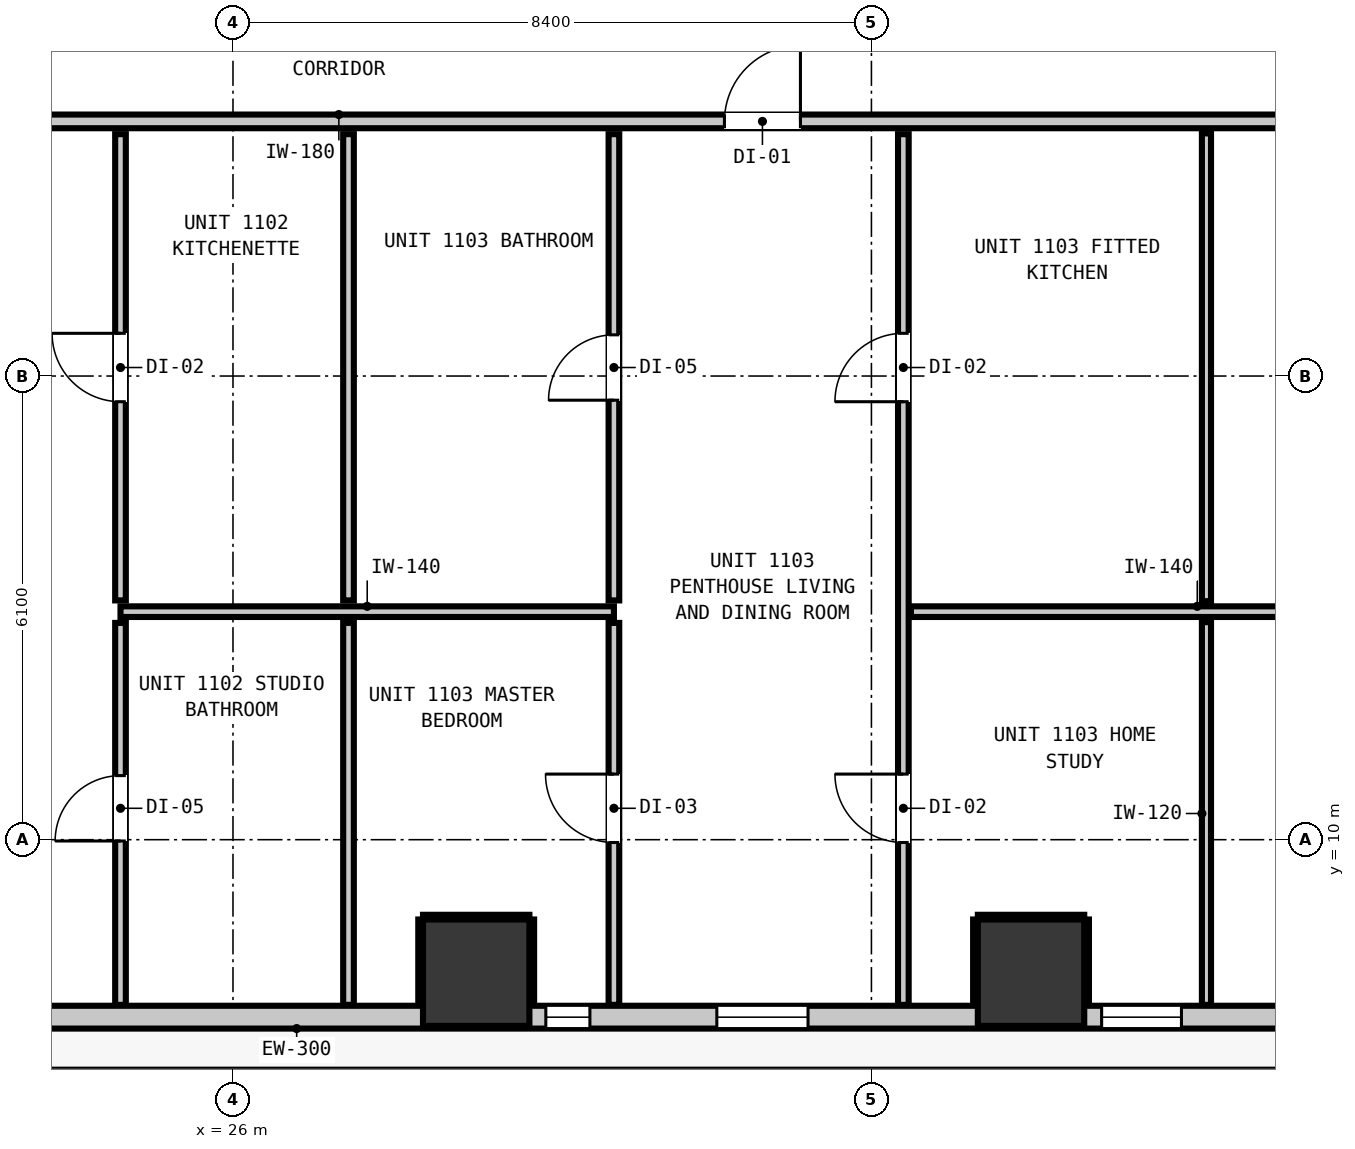
"""IFC4 building model, lengths in metres.
Left out: names, types, materials, properties, quantities, classifications, styles, units other than length and angle.
Written with IfcOpenShell. Run it as: python <this file> out.ifc"""

import sys

from ifc_helpers import new_model, si_unit, direction, frame, frame_2d, origin, origin_2d, place, context, subcontext, project, spatial, rectangle, extrude, element, fill, save


model = new_model("IFC4")
c1 = context("Model", 3, precision=1e-05, world=origin(), true_north=direction((0.0, 1.0)))
c2 = subcontext(c1, "Body", "Model", "MODEL_VIEW")
j1 = project(units=[si_unit("LENGTHUNIT", "METRE"), si_unit("PLANEANGLEUNIT", "RADIAN")], contexts=[c1])
p1 = place(None, origin())
s1 = spatial("IfcSite", under=j1, at=p1, CompositionType="ELEMENT")
p2 = place(p1, origin())
s2 = spatial("IfcBuilding", under=s1, at=p2, CompositionType="ELEMENT")
p3 = place(p2, frame((0.0, 0.0, 41.92)))
s3 = spatial("IfcBuildingStorey", under=s2, at=p3, CompositionType="ELEMENT", Elevation=41.92)
for number, where, z_axis, x_axis in (
    (1, (29.2, 8.25, -0.2), (0.0, 0.0, 1.0), (1.0, 0.0, 0.0)),
    (2, (36.5, 8.25, -0.2), (0.0, 0.0, 1.0), (1.0, 0.0, 0.0)),
):
    element("IfcColumn", number, at=place(p3, frame(where, z_axis=z_axis, x_axis=x_axis)), inside=s3, PredefinedType="COLUMN", context=c2, shape_type="SweptSolid", body=[
        extrude(rectangle(XDim=1.4, YDim=1.4, at=origin_2d()), origin(), (0.0, 0.0, 1.0), 3.52),
    ])
p4 = place(p3, frame((47.835, 7.665, 0.0), z_axis=(0.0, 0.0, 1.0), x_axis=(-1.0, 0.0, 0.0)))
e3 = element("IfcWall", 3, at=p4, inside=s3, PredefinedType="STANDARD", context=c2, shape_type="SweptSolid", body=[
    extrude(rectangle(XDim=37.47, YDim=0.3, at=frame_2d((18.735, 0.0))), origin(), (0.0, 0.0, 1.0), 3.06),
])
p5 = place(p4, frame((1.251, 0.0, 0.0)))
e4 = element("IfcOpeningElement", 4, at=p5, cuts=e3, PredefinedType="OPENING", context=c2, shape_type="SweptSolid", body=[
    extrude(rectangle(XDim=1.0, YDim=2.15, at=frame_2d((0.5, 1.075))), frame((0.0, 0.16, 0.0), z_axis=(0.0, -1.0, 0.0), x_axis=(1.0, 0.0, 0.0)), (0.0, 0.0, 1.0), 0.32),
])
p6 = place(p4, frame((30.675, 0.0, 0.85)))
e5 = element("IfcOpeningElement", 5, at=p6, cuts=e3, PredefinedType="OPENING", context=c2, shape_type="SweptSolid", body=[
    extrude(rectangle(XDim=1.2, YDim=1.8, at=frame_2d((0.6, 0.9))), frame((0.0, 0.16, 0.0), z_axis=(0.0, -1.0, 0.0), x_axis=(1.0, 0.0, 0.0)), (0.0, 0.0, 1.0), 0.32),
])
p7 = place(p4, frame((24.275, 0.0, 0.85)))
e6 = element("IfcOpeningElement", 6, at=p7, cuts=e3, PredefinedType="OPENING", context=c2, shape_type="SweptSolid", body=[
    extrude(rectangle(XDim=1.2, YDim=1.8, at=frame_2d((0.6, 0.9))), frame((0.0, 0.16, 0.0), z_axis=(0.0, -1.0, 0.0), x_axis=(1.0, 0.0, 0.0)), (0.0, 0.0, 1.0), 0.32),
])
p8 = place(p4, frame((14.269, 0.0, 0.85)))
e7 = element("IfcOpeningElement", 7, at=p8, cuts=e3, PredefinedType="OPENING", context=c2, shape_type="SweptSolid", body=[
    extrude(rectangle(XDim=1.2, YDim=1.8, at=frame_2d((0.6, 0.9))), frame((0.0, 0.16, 0.0), z_axis=(0.0, -1.0, 0.0), x_axis=(1.0, 0.0, 0.0)), (0.0, 0.0, 1.0), 0.32),
])
p9 = place(p4, frame((17.139, 0.0, 0.85)))
e8 = element("IfcOpeningElement", 8, at=p9, cuts=e3, PredefinedType="OPENING", context=c2, shape_type="SweptSolid", body=[
    extrude(rectangle(XDim=0.58, YDim=1.5, at=frame_2d((0.29, 0.75))), frame((0.0, 0.16, 0.0), z_axis=(0.0, -1.0, 0.0), x_axis=(1.0, 0.0, 0.0)), (0.0, 0.0, 1.0), 0.32),
])
p10 = place(p4, frame((9.356, 0.0, 0.85)))
e9 = element("IfcOpeningElement", 9, at=p10, cuts=e3, PredefinedType="OPENING", context=c2, shape_type="SweptSolid", body=[
    extrude(rectangle(XDim=1.05, YDim=1.65, at=frame_2d((0.525, 0.825))), frame((0.0, 0.16, 0.0), z_axis=(0.0, -1.0, 0.0), x_axis=(1.0, 0.0, 0.0)), (0.0, 0.0, 1.0), 0.32),
])
p11 = place(p4, frame((5.089, 0.0, 0.85)))
e10 = element("IfcOpeningElement", 10, at=p11, cuts=e3, PredefinedType="OPENING", context=c2, shape_type="SweptSolid", body=[
    extrude(rectangle(XDim=1.2, YDim=1.8, at=frame_2d((0.6, 0.9))), frame((0.0, 0.16, 0.0), z_axis=(0.0, -1.0, 0.0), x_axis=(1.0, 0.0, 0.0)), (0.0, 0.0, 1.0), 0.32),
])
p12 = place(p3, frame((8.027, 19.45, 0.0), z_axis=(0.0, 0.0, 1.0), x_axis=(1.0, 0.0, 0.0)))
e11 = element("IfcWall", 11, at=p12, inside=s3, PredefinedType="PARTITIONING", context=c2, shape_type="SweptSolid", body=[
    extrude(rectangle(XDim=42.146, YDim=0.18, at=frame_2d((21.073, 0.0))), origin(), (0.0, 0.0, 1.0), 3.06),
])
p13 = place(p12, frame((6.533, 0.0, 0.0)))
e12 = element("IfcOpeningElement", 12, at=p13, cuts=e11, PredefinedType="OPENING", context=c2, shape_type="SweptSolid", body=[
    extrude(rectangle(XDim=1.0, YDim=2.15, at=frame_2d((0.5, 1.075))), frame((0.0, 0.1, 0.0), z_axis=(0.0, -1.0, 0.0), x_axis=(1.0, 0.0, 0.0)), (0.0, 0.0, 1.0), 0.2),
])
p14 = place(p12, frame((13.293, 0.0, 0.0)))
e13 = element("IfcOpeningElement", 13, at=p14, cuts=e11, PredefinedType="OPENING", context=c2, shape_type="SweptSolid", body=[
    extrude(rectangle(XDim=1.0, YDim=2.15, at=frame_2d((0.5, 1.075))), frame((0.0, 0.1, 0.0), z_axis=(0.0, -1.0, 0.0), x_axis=(1.0, 0.0, 0.0)), (0.0, 0.0, 1.0), 0.2),
])
p15 = place(p12, frame((24.439, 0.0, 0.0)))
e14 = element("IfcOpeningElement", 14, at=p15, cuts=e11, PredefinedType="OPENING", context=c2, shape_type="SweptSolid", body=[
    extrude(rectangle(XDim=1.0, YDim=2.15, at=frame_2d((0.5, 1.075))), frame((0.0, 0.1, 0.0), z_axis=(0.0, -1.0, 0.0), x_axis=(1.0, 0.0, 0.0)), (0.0, 0.0, 1.0), 0.2),
])
p16 = place(p12, frame((34.477, 0.0, 0.0)))
e15 = element("IfcOpeningElement", 15, at=p16, cuts=e11, PredefinedType="OPENING", context=c2, shape_type="SweptSolid", body=[
    extrude(rectangle(XDim=1.0, YDim=2.15, at=frame_2d((0.5, 1.075))), frame((0.0, 0.1, 0.0), z_axis=(0.0, -1.0, 0.0), x_axis=(1.0, 0.0, 0.0)), (0.0, 0.0, 1.0), 0.2),
])
p17 = place(p3, frame((24.52, 13.0, 0.0), z_axis=(0.0, 0.0, 1.0), x_axis=(1.0, 0.0, 0.0)))
e16 = element("IfcWall", 16, at=p17, inside=s3, PredefinedType="PARTITIONING", context=c2, shape_type="SweptSolid", body=[
    extrude(rectangle(XDim=6.492, YDim=0.14, at=frame_2d((3.246, 0.0))), origin(), (0.0, 0.0, 1.0), 3.06),
])
p18 = place(p3, frame((34.92, 13.0, 0.0), z_axis=(0.0, 0.0, 1.0), x_axis=(1.0, 0.0, 0.0)))
e17 = element("IfcWall", 17, at=p18, inside=s3, PredefinedType="PARTITIONING", context=c2, shape_type="SweptSolid", body=[
    extrude(rectangle(XDim=15.253, YDim=0.14, at=frame_2d((7.626, 0.0))), origin(), (0.0, 0.0, 1.0), 3.06),
])
p19 = place(p18, frame((7.634, 0.0, 0.0)))
e18 = element("IfcOpeningElement", 18, at=p19, cuts=e17, PredefinedType="OPENING", context=c2, shape_type="SweptSolid", body=[
    extrude(rectangle(XDim=0.9, YDim=2.1, at=frame_2d((0.45, 1.05))), frame((0.0, 0.08, 0.0), z_axis=(0.0, -1.0, 0.0), x_axis=(1.0, 0.0, 0.0)), (0.0, 0.0, 1.0), 0.16),
])
p20 = place(p3, frame((24.52, 7.827, 0.0), z_axis=(0.0, 0.0, 1.0), x_axis=(0.0, 1.0, 0.0)))
e19 = element("IfcWall", 19, at=p20, inside=s3, PredefinedType="PARTITIONING", context=c2, shape_type="SweptSolid", body=[
    extrude(rectangle(XDim=5.025, YDim=0.14, at=frame_2d((2.513, 0.0))), origin(), (0.0, 0.0, 1.0), 3.06),
])
p21 = place(p20, frame((2.156, 0.0, 0.0)))
e20 = element("IfcOpeningElement", 20, at=p21, cuts=e19, PredefinedType="OPENING", context=c2, shape_type="SweptSolid", body=[
    extrude(rectangle(XDim=0.86, YDim=2.02, at=frame_2d((0.43, 1.01))), frame((0.0, 0.08, 0.0), z_axis=(0.0, -1.0, 0.0), x_axis=(1.0, 0.0, 0.0)), (0.0, 0.0, 1.0), 0.16),
])
p22 = place(p3, frame((24.52, 13.148, 0.0), z_axis=(0.0, 0.0, 1.0), x_axis=(0.0, 1.0, 0.0)))
e21 = element("IfcWall", 21, at=p22, inside=s3, PredefinedType="PARTITIONING", context=c2, shape_type="SweptSolid", body=[
    extrude(rectangle(XDim=6.134, YDim=0.14, at=frame_2d((3.067, 0.0))), origin(), (0.0, 0.0, 1.0), 3.06),
])
p23 = place(p22, frame((2.614, 0.0, 0.0)))
e22 = element("IfcOpeningElement", 22, at=p23, cuts=e21, PredefinedType="OPENING", context=c2, shape_type="SweptSolid", body=[
    extrude(rectangle(XDim=0.9, YDim=2.1, at=frame_2d((0.45, 1.05))), frame((0.0, 0.08, 0.0), z_axis=(0.0, -1.0, 0.0), x_axis=(1.0, 0.0, 0.0)), (0.0, 0.0, 1.0), 0.16),
])
p24 = place(p3, frame((27.52, 7.827, 0.0), z_axis=(0.0, 0.0, 1.0), x_axis=(0.0, 1.0, 0.0)))
e23 = element("IfcWall", 23, at=p24, inside=s3, PredefinedType="PARTITIONING", context=c2, shape_type="SweptSolid", body=[
    extrude(rectangle(XDim=5.025, YDim=0.14, at=frame_2d((2.513, 0.0))), origin(), (0.0, 0.0, 1.0), 3.06),
])
p25 = place(p3, frame((27.52, 13.148, 0.0), z_axis=(0.0, 0.0, 1.0), x_axis=(0.0, 1.0, 0.0)))
e24 = element("IfcWall", 24, at=p25, inside=s3, PredefinedType="PARTITIONING", context=c2, shape_type="SweptSolid", body=[
    extrude(rectangle(XDim=6.134, YDim=0.14, at=frame_2d((3.067, 0.0))), origin(), (0.0, 0.0, 1.0), 3.06),
])
p26 = place(p3, frame((31.012, 7.827, 0.0), z_axis=(0.0, 0.0, 1.0), x_axis=(0.0, 1.0, 0.0)))
e25 = element("IfcWall", 25, at=p26, inside=s3, PredefinedType="PARTITIONING", context=c2, shape_type="SweptSolid", body=[
    extrude(rectangle(XDim=5.025, YDim=0.14, at=frame_2d((2.513, 0.0))), origin(), (0.0, 0.0, 1.0), 3.06),
])
p27 = place(p26, frame((2.136, 0.0, 0.0)))
e26 = element("IfcOpeningElement", 26, at=p27, cuts=e25, PredefinedType="OPENING", context=c2, shape_type="SweptSolid", body=[
    extrude(rectangle(XDim=0.9, YDim=2.1, at=frame_2d((0.45, 1.05))), frame((0.0, 0.08, 0.0), z_axis=(0.0, -1.0, 0.0), x_axis=(1.0, 0.0, 0.0)), (0.0, 0.0, 1.0), 0.16),
])
p28 = place(p3, frame((31.012, 13.148, 0.0), z_axis=(0.0, 0.0, 1.0), x_axis=(0.0, 1.0, 0.0)))
e27 = element("IfcWall", 27, at=p28, inside=s3, PredefinedType="PARTITIONING", context=c2, shape_type="SweptSolid", body=[
    extrude(rectangle(XDim=6.134, YDim=0.14, at=frame_2d((3.067, 0.0))), origin(), (0.0, 0.0, 1.0), 3.06),
])
p29 = place(p28, frame((2.634, 0.0, 0.0)))
e28 = element("IfcOpeningElement", 28, at=p29, cuts=e27, PredefinedType="OPENING", context=c2, shape_type="SweptSolid", body=[
    extrude(rectangle(XDim=0.86, YDim=2.02, at=frame_2d((0.43, 1.01))), frame((0.0, 0.08, 0.0), z_axis=(0.0, -1.0, 0.0), x_axis=(1.0, 0.0, 0.0)), (0.0, 0.0, 1.0), 0.16),
])
p30 = place(p3, frame((34.82, 7.827, 0.0), z_axis=(0.0, 0.0, 1.0), x_axis=(0.0, 1.0, 0.0)))
e29 = element("IfcWall", 29, at=p30, inside=s3, PredefinedType="PARTITIONING", context=c2, shape_type="SweptSolid", body=[
    extrude(rectangle(XDim=11.455, YDim=0.14, at=frame_2d((5.728, 0.0))), origin(), (0.0, 0.0, 1.0), 3.06),
])
p31 = place(p30, frame((7.935, 0.0, 0.0)))
e30 = element("IfcOpeningElement", 30, at=p31, cuts=e29, PredefinedType="OPENING", context=c2, shape_type="SweptSolid", body=[
    extrude(rectangle(XDim=0.9, YDim=2.1, at=frame_2d((0.45, 1.05))), frame((0.0, 0.08, 0.0), z_axis=(0.0, -1.0, 0.0), x_axis=(1.0, 0.0, 0.0)), (0.0, 0.0, 1.0), 0.16),
])
p32 = place(p30, frame((2.136, 0.0, 0.0)))
e31 = element("IfcOpeningElement", 31, at=p32, cuts=e29, PredefinedType="OPENING", context=c2, shape_type="SweptSolid", body=[
    extrude(rectangle(XDim=0.9, YDim=2.1, at=frame_2d((0.45, 1.05))), frame((0.0, 0.08, 0.0), z_axis=(0.0, -1.0, 0.0), x_axis=(1.0, 0.0, 0.0)), (0.0, 0.0, 1.0), 0.16),
])
p33 = place(p3, frame((38.808, 7.827, 0.0), z_axis=(0.0, 0.0, 1.0), x_axis=(0.0, 1.0, 0.0)))
e32 = element("IfcWall", 32, at=p33, inside=s3, PredefinedType="PARTITIONING", context=c2, shape_type="SweptSolid", body=[
    extrude(rectangle(XDim=5.035, YDim=0.12, at=frame_2d((2.518, 0.0))), origin(), (0.0, 0.0, 1.0), 3.06),
])
p34 = place(p3, frame((38.808, 13.138, 0.0), z_axis=(0.0, 0.0, 1.0), x_axis=(0.0, 1.0, 0.0)))
e33 = element("IfcWall", 33, at=p34, inside=s3, PredefinedType="PARTITIONING", context=c2, shape_type="SweptSolid", body=[
    extrude(rectangle(XDim=6.154, YDim=0.12, at=frame_2d((3.077, 0.0))), origin(), (0.0, 0.0, 1.0), 3.06),
])
p35 = place(p3, frame((28.5, 8.982, 0.0), z_axis=(0.0, 0.0, 1.0), x_axis=(1.0, 0.0, 0.0)))
e34 = element("IfcWall", 34, at=p35, inside=s3, PredefinedType="PARTITIONING", context=c2, shape_type="SweptSolid", body=[
    extrude(rectangle(XDim=1.4, YDim=0.06, at=frame_2d((0.7, 0.0))), origin(), (0.0, 0.0, 1.0), 1.45),
])
for number, where, z_axis, x_axis in (
    (35, (28.468, 7.83, 0.0), (0.0, 0.0, 1.0), (0.0, 1.0, 0.0)),
    (36, (29.932, 7.83, 0.0), (0.0, 0.0, 1.0), (0.0, 1.0, 0.0)),
):
    element("IfcWall", number, at=place(p3, frame(where, z_axis=z_axis, x_axis=x_axis)), inside=s3, PredefinedType="PARTITIONING", context=c2, shape_type="SweptSolid", body=[
        extrude(rectangle(XDim=1.12, YDim=0.06, at=frame_2d((0.56, 0.0))), origin(), (0.0, 0.0, 1.0), 1.45),
    ])
p36 = place(p3, frame((35.8, 8.982, 0.0), z_axis=(0.0, 0.0, 1.0), x_axis=(1.0, 0.0, 0.0)))
e37 = element("IfcWall", 37, at=p36, inside=s3, PredefinedType="PARTITIONING", context=c2, shape_type="SweptSolid", body=[
    extrude(rectangle(XDim=1.4, YDim=0.06, at=frame_2d((0.7, 0.0))), origin(), (0.0, 0.0, 1.0), 1.45),
])
for number, where, z_axis, x_axis in (
    (38, (35.768, 7.83, 0.0), (0.0, 0.0, 1.0), (0.0, 1.0, 0.0)),
    (39, (37.232, 7.83, 0.0), (0.0, 0.0, 1.0), (0.0, 1.0, 0.0)),
):
    element("IfcWall", number, at=place(p3, frame(where, z_axis=z_axis, x_axis=x_axis)), inside=s3, PredefinedType="PARTITIONING", context=c2, shape_type="SweptSolid", body=[
        extrude(rectangle(XDim=1.12, YDim=0.06, at=frame_2d((0.56, 0.0))), origin(), (0.0, 0.0, 1.0), 1.45),
    ])
p37 = place(p8, origin())
e40 = element("IfcWindow", 40, at=p37, inside=s3, PartitioningType="SINGLE_PANEL", PredefinedType="WINDOW", context=c2, shape_type="SweptSolid", body=[
    extrude(rectangle(XDim=1.2, YDim=1.8, at=frame_2d((0.6, 0.9))), frame((0.0, 0.03, 0.0), z_axis=(0.0, -1.0, 0.0), x_axis=(1.0, 0.0, 0.0)), (0.0, 0.0, 1.0), 0.06),
])
fill(e7, e40)
p38 = place(p9, origin())
e41 = element("IfcWindow", 41, at=p38, inside=s3, PartitioningType="SINGLE_PANEL", PredefinedType="WINDOW", context=c2, shape_type="SweptSolid", body=[
    extrude(rectangle(XDim=0.58, YDim=1.5, at=frame_2d((0.29, 0.75))), frame((0.0, 0.03, 0.0), z_axis=(0.0, -1.0, 0.0), x_axis=(1.0, 0.0, 0.0)), (0.0, 0.0, 1.0), 0.06),
])
fill(e8, e41)
p39 = place(p10, origin())
e42 = element("IfcWindow", 42, at=p39, inside=s3, PartitioningType="SINGLE_PANEL", PredefinedType="WINDOW", context=c2, shape_type="SweptSolid", body=[
    extrude(rectangle(XDim=1.05, YDim=1.65, at=frame_2d((0.525, 0.825))), frame((0.0, 0.03, 0.0), z_axis=(0.0, -1.0, 0.0), x_axis=(1.0, 0.0, 0.0)), (0.0, 0.0, 1.0), 0.06),
])
fill(e9, e42)
p40 = place(p23, origin())
e43 = element("IfcDoor", 43, at=p40, inside=s3, OperationType="SINGLE_SWING_RIGHT", PredefinedType="DOOR", context=c2, shape_type="SweptSolid", body=[
    extrude(rectangle(XDim=0.9, YDim=2.1, at=frame_2d((0.45, 1.05))), frame((0.0, 0.025, 0.0), z_axis=(0.0, -1.0, 0.0), x_axis=(1.0, 0.0, 0.0)), (0.0, 0.0, 1.0), 0.05),
])
fill(e22, e43)
p41 = place(p21, origin())
e44 = element("IfcDoor", 44, at=p41, inside=s3, OperationType="SINGLE_SWING_LEFT", PredefinedType="DOOR", context=c2, shape_type="SweptSolid", body=[
    extrude(rectangle(XDim=0.86, YDim=2.02, at=frame_2d((0.43, 1.01))), frame((0.0, 0.025, 0.0), z_axis=(0.0, -1.0, 0.0), x_axis=(1.0, 0.0, 0.0)), (0.0, 0.0, 1.0), 0.05),
])
fill(e20, e44)
p42 = place(p15, origin())
e45 = element("IfcDoor", 45, at=p42, inside=s3, OperationType="SINGLE_SWING_RIGHT", PredefinedType="DOOR", context=c2, shape_type="SweptSolid", body=[
    extrude(rectangle(XDim=1.0, YDim=2.15, at=frame_2d((0.5, 1.075))), frame((0.0, 0.025, 0.0), z_axis=(0.0, -1.0, 0.0), x_axis=(1.0, 0.0, 0.0)), (0.0, 0.0, 1.0), 0.05),
])
fill(e14, e45)
p43 = place(p29, origin())
e46 = element("IfcDoor", 46, at=p43, inside=s3, OperationType="SINGLE_SWING_LEFT", PredefinedType="DOOR", context=c2, shape_type="SweptSolid", body=[
    extrude(rectangle(XDim=0.86, YDim=2.02, at=frame_2d((0.43, 1.01))), frame((0.0, 0.025, 0.0), z_axis=(0.0, -1.0, 0.0), x_axis=(1.0, 0.0, 0.0)), (0.0, 0.0, 1.0), 0.05),
])
fill(e28, e46)
p44 = place(p27, origin())
e47 = element("IfcDoor", 47, at=p44, inside=s3, OperationType="SINGLE_SWING_RIGHT", PredefinedType="DOOR", context=c2, shape_type="SweptSolid", body=[
    extrude(rectangle(XDim=0.9, YDim=2.1, at=frame_2d((0.45, 1.05))), frame((0.0, 0.025, 0.0), z_axis=(0.0, -1.0, 0.0), x_axis=(1.0, 0.0, 0.0)), (0.0, 0.0, 1.0), 0.05),
])
fill(e26, e47)
p45 = place(p31, origin())
e48 = element("IfcDoor", 48, at=p45, inside=s3, OperationType="SINGLE_SWING_LEFT", PredefinedType="DOOR", context=c2, shape_type="SweptSolid", body=[
    extrude(rectangle(XDim=0.9, YDim=2.1, at=frame_2d((0.45, 1.05))), frame((0.0, 0.025, 0.0), z_axis=(0.0, -1.0, 0.0), x_axis=(1.0, 0.0, 0.0)), (0.0, 0.0, 1.0), 0.05),
])
fill(e30, e48)
p46 = place(p32, origin())
e49 = element("IfcDoor", 49, at=p46, inside=s3, OperationType="SINGLE_SWING_RIGHT", PredefinedType="DOOR", context=c2, shape_type="SweptSolid", body=[
    extrude(rectangle(XDim=0.9, YDim=2.1, at=frame_2d((0.45, 1.05))), frame((0.0, 0.025, 0.0), z_axis=(0.0, -1.0, 0.0), x_axis=(1.0, 0.0, 0.0)), (0.0, 0.0, 1.0), 0.05),
])
fill(e31, e49)
save(model, sys.argv[1])
